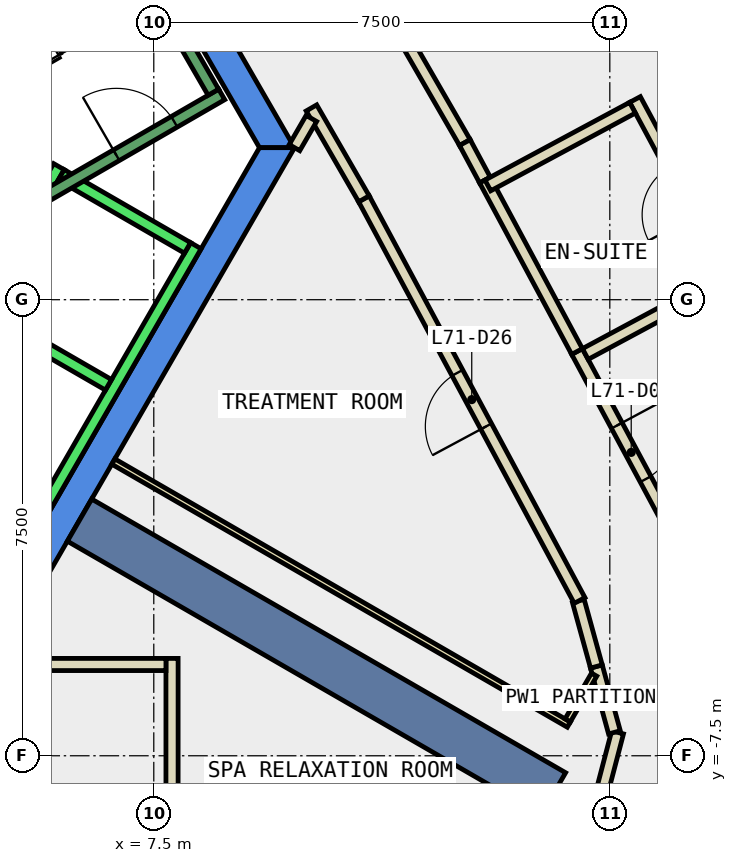
"""IFC4 building model, lengths in metres.
Left out: names, types, materials, properties, quantities, classifications, styles, units other than length and angle.
Written with IfcOpenShell. Run it as: python <this file> out.ifc"""

import sys

from ifc_helpers import new_model, si_unit, direction, frame, frame_2d, origin, place, context, subcontext, project, spatial, polyline, rectangle, outline, extrude, element, fill, save


model = new_model("IFC4")
c1 = context("Model", 3, precision=1e-05, world=origin(), true_north=direction((0.0, 1.0)))
c2 = subcontext(c1, "Body", "Model", "MODEL_VIEW")
j1 = project(units=[si_unit("LENGTHUNIT", "METRE"), si_unit("PLANEANGLEUNIT", "RADIAN")], contexts=[c1])
p1 = place(None, origin())
s1 = spatial("IfcSite", under=j1, at=p1, CompositionType="ELEMENT")
p2 = place(p1, origin())
s2 = spatial("IfcBuilding", under=s1, at=p2, CompositionType="ELEMENT")
p3 = place(p2, frame((0.0, 0.0, 304.4)))
s3 = spatial("IfcBuildingStorey", under=s2, at=p3, CompositionType="ELEMENT", Elevation=304.4)
p4 = place(p3, frame((0.0, 0.0, -0.34)))
e1 = element("IfcWall", 1, at=p4, inside=s3, PredefinedType="SHEAR", context=c2, shape_type="SweptSolid", body=[
    extrude(outline(polyline([(5.486, 9.998), (5.053, 9.748), (9.238, 2.5), (9.815, 2.5), (5.486, 9.998)])), origin(), (0.0, 0.0, 1.0), 3.6),
])
p5 = place(p3, frame((0.0, 0.0, -0.34)))
e2 = element("IfcWall", 2, at=p5, inside=s3, PredefinedType="SHEAR", context=c2, shape_type="SweptSolid", body=[
    extrude(outline(polyline([(4.907, -6.0), (9.815, 2.5), (9.238, 2.5), (4.619, -5.5), (4.907, -6.0)])), origin(), (0.0, 0.0, 1.0), 3.6),
])
p6 = place(p3, frame((6.279, -3.625, -0.34), z_axis=(0.0, 0.0, 1.0), x_axis=(0.866017533419, -0.500013631625, 0.0)))
e3 = element("IfcWall", 3, at=p6, inside=s3, PredefinedType="SHEAR", context=c2, shape_type="SweptSolid", body=[
    extrude(rectangle(XDim=9.0, YDim=0.8, at=frame_2d((4.5, 0.0))), origin(), (0.0, 0.0, 1.0), 3.6),
])
p7 = place(p3, frame((14.785, -8.425, 0.0), z_axis=(0.0, 0.0, 1.0), x_axis=(0.253295121261, 0.967389053869, 0.0)))
e4 = element("IfcWall", 4, at=p7, inside=s3, PredefinedType="PARTITIONING", context=c2, shape_type="SweptSolid", body=[
    extrude(rectangle(XDim=1.354, YDim=0.2, at=frame_2d((0.677, 0.0))), origin(), (0.0, 0.0, 1.0), 3.26),
])
p8 = place(p3, frame((15.076, -7.115, 0.0), z_axis=(0.0, 0.0, 1.0), x_axis=(-0.264368116744, 0.964421846937, 0.0)))
e5 = element("IfcWall", 5, at=p8, inside=s3, PredefinedType="PARTITIONING", context=c2, shape_type="SweptSolid", body=[
    extrude(rectangle(XDim=1.123, YDim=0.2, at=frame_2d((0.562, 0.0))), origin(), (0.0, 0.0, 1.0), 3.26),
])
p9 = place(p3, frame((14.779, -6.032, 0.0), z_axis=(0.0, 0.0, 1.0), x_axis=(-0.265740072272, 0.964044715762, 0.0)))
e6 = element("IfcWall", 6, at=p9, inside=s3, PredefinedType="PARTITIONING", context=c2, shape_type="SweptSolid", body=[
    extrude(rectangle(XDim=1.118, YDim=0.2, at=frame_2d((0.559, 0.0))), origin(), (0.0, 0.0, 1.0), 3.26),
])
p10 = place(p3, frame((14.503, -4.946, 0.0), z_axis=(0.0, 0.0, 1.0), x_axis=(-0.473101362557, 0.881008002658, 0.0)))
e7 = element("IfcWall", 7, at=p10, inside=s3, PredefinedType="PARTITIONING", context=c2, shape_type="SweptSolid", body=[
    extrude(rectangle(XDim=7.497, YDim=0.2, at=frame_2d((3.749, 0.0))), origin(), (0.0, 0.0, 1.0), 3.26),
])
p11 = place(p10, frame((3.249, 0.0, 0.0)))
e8 = element("IfcOpeningElement", 8, at=p11, cuts=e7, PredefinedType="OPENING", context=c2, shape_type="SweptSolid", body=[
    extrude(rectangle(XDim=1.0, YDim=2.1, at=frame_2d((0.5, 1.05))), frame((0.0, 0.11, 0.0), z_axis=(0.0, -1.0, 0.0), x_axis=(1.0, 0.0, 0.0)), (0.0, 0.0, 1.0), 0.22),
])
p12 = place(p3, frame((10.956, 1.659, 0.0), z_axis=(0.0, 0.0, 1.0), x_axis=(-0.49992648901, 0.866067841215, 0.0)))
e9 = element("IfcWall", 9, at=p12, inside=s3, PredefinedType="PARTITIONING", context=c2, shape_type="SweptSolid", body=[
    extrude(rectangle(XDim=1.726, YDim=0.2, at=frame_2d((0.863, 0.0))), origin(), (0.0, 0.0, 1.0), 3.26),
])
p13 = place(p3, frame((10.092, 2.981, 0.0), z_axis=(0.0, 0.0, 1.0), x_axis=(-0.501296484717, -0.865275582927, 0.0)))
e10 = element("IfcWall", 10, at=p13, inside=s3, PredefinedType="PARTITIONING", context=c2, shape_type="SweptSolid", body=[
    extrude(rectangle(XDim=0.555, YDim=0.2, at=frame_2d((0.277, 0.0))), origin(), (0.0, 0.0, 1.0), 3.26),
])
p14 = place(p3, frame((14.461, -0.852, 0.0), z_axis=(0.0, 0.0, 1.0), x_axis=(0.473160180459, -0.88097641491, 0.0)))
e11 = element("IfcWall", 11, at=p14, inside=s3, PredefinedType="PARTITIONING", context=c2, shape_type="SweptSolid", body=[
    extrude(rectangle(XDim=3.766, YDim=0.2, at=frame_2d((1.883, 0.0))), origin(), (0.0, 0.0, 1.0), 3.26),
])
p15 = place(p14, frame((1.383, 0.0, 0.0)))
e12 = element("IfcOpeningElement", 12, at=p15, cuts=e11, PredefinedType="OPENING", context=c2, shape_type="SweptSolid", body=[
    extrude(rectangle(XDim=1.0, YDim=2.1, at=frame_2d((0.5, 1.05))), frame((0.0, 0.11, 0.0), z_axis=(0.0, -1.0, 0.0), x_axis=(1.0, 0.0, 0.0)), (0.0, 0.0, 1.0), 0.22),
])
p16 = place(p3, frame((10.618, 6.044, 0.0), z_axis=(0.0, 0.0, 1.0), x_axis=(0.50008212199, -0.86597798544, 0.0)))
e13 = element("IfcWall", 13, at=p16, inside=s3, PredefinedType="PARTITIONING", context=c2, shape_type="SweptSolid", body=[
    extrude(rectangle(XDim=3.995, YDim=0.2, at=frame_2d((1.998, 0.0))), origin(), (0.0, 0.0, 1.0), 3.26),
])
p17 = place(p3, frame((12.616, 2.584, 0.0), z_axis=(0.0, 0.0, 1.0), x_axis=(0.472830911699, -0.881153181315, 0.0)))
e14 = element("IfcWall", 14, at=p17, inside=s3, PredefinedType="PARTITIONING", context=c2, shape_type="SweptSolid", body=[
    extrude(rectangle(XDim=0.7, YDim=0.2, at=frame_2d((0.35, 0.0))), origin(), (0.0, 0.0, 1.0), 3.26),
])
p18 = place(p3, frame((12.947, 1.967, 0.0), z_axis=(0.0, 0.0, 1.0), x_axis=(0.473116768279, -0.88099972961, 0.0)))
e15 = element("IfcWall", 15, at=p18, inside=s3, PredefinedType="PARTITIONING", context=c2, shape_type="SweptSolid", body=[
    extrude(rectangle(XDim=3.2, YDim=0.2, at=frame_2d((1.6, 0.0))), origin(), (0.0, 0.0, 1.0), 3.26),
])
p19 = place(p3, frame((7.8, -5.899, 0.0), z_axis=(0.0, 0.0, 1.0), x_axis=(0.0, -1.0, 0.0)))
e16 = element("IfcWall", 16, at=p19, inside=s3, PredefinedType="PARTITIONING", context=c2, shape_type="SweptSolid", body=[
    extrude(rectangle(XDim=4.66, YDim=0.2, at=frame_2d((2.33, 0.0))), origin(), (0.0, 0.0, 1.0), 3.26),
])
p20 = place(p3, frame((6.835, -2.662, 0.0), z_axis=(0.0, 0.0, 1.0), x_axis=(0.866023427642, -0.500003422764, 0.0)))
e17 = element("IfcWall", 17, at=p20, inside=s3, PredefinedType="PARTITIONING", context=c2, shape_type="SweptSolid", body=[
    extrude(rectangle(XDim=8.65, YDim=0.1, at=frame_2d((4.325, 0.0))), origin(), (0.0, 0.0, 1.0), 3.26),
])
p21 = place(p3, frame((14.307, -6.919, 0.0), z_axis=(0.0, 0.0, 1.0), x_axis=(0.500305662732, 0.865848857387, 0.0)))
e18 = element("IfcWall", 18, at=p21, inside=s3, PredefinedType="PARTITIONING", context=c2, shape_type="SweptSolid", body=[
    extrude(rectangle(XDim=0.87, YDim=0.1, at=frame_2d((0.435, 0.0))), origin(), (0.0, 0.0, 1.0), 3.26),
])
p22 = place(p3, frame((14.597, -0.893, 0.0), z_axis=(0.0, 0.0, 1.0), x_axis=(0.880971229432, 0.473169835168, 0.0)))
e19 = element("IfcWall", 19, at=p22, inside=s3, PredefinedType="PARTITIONING", context=c2, shape_type="SweptSolid", body=[
    extrude(rectangle(XDim=2.599, YDim=0.2, at=frame_2d((1.3, 0.0))), origin(), (0.0, 0.0, 1.0), 3.26),
])
p23 = place(p3, frame((17.023, 0.297, 0.0), z_axis=(0.0, 0.0, 1.0), x_axis=(-0.473247398557, 0.88092956572, 0.0)))
e20 = element("IfcWall", 20, at=p23, inside=s3, PredefinedType="PARTITIONING", context=c2, shape_type="SweptSolid", body=[
    extrude(rectangle(XDim=3.4, YDim=0.2, at=frame_2d((1.7, 0.0))), origin(), (0.0, 0.0, 1.0), 3.26),
])
p24 = place(p23, frame((1.25, 0.0, 0.0)))
e21 = element("IfcOpeningElement", 21, at=p24, cuts=e20, PredefinedType="OPENING", context=c2, shape_type="SweptSolid", body=[
    extrude(rectangle(XDim=0.9, YDim=2.1, at=frame_2d((0.45, 1.05))), frame((0.0, 0.11, 0.0), z_axis=(0.0, -1.0, 0.0), x_axis=(1.0, 0.0, 0.0)), (0.0, 0.0, 1.0), 0.22),
])
p25 = place(p3, frame((15.373, 3.157, 0.0), z_axis=(0.0, 0.0, 1.0), x_axis=(-0.880935111027, -0.473237076062, 0.0)))
e22 = element("IfcWall", 22, at=p25, inside=s3, PredefinedType="PARTITIONING", context=c2, shape_type="SweptSolid", body=[
    extrude(rectangle(XDim=2.701, YDim=0.2, at=frame_2d((1.35, 0.0))), origin(), (0.0, 0.0, 1.0), 3.26),
])
p26 = place(p3, frame((5.076, -5.999, 0.0), z_axis=(0.0, 0.0, 1.0), x_axis=(1.0, 0.0, 0.0)))
e23 = element("IfcWall", 23, at=p26, inside=s3, PredefinedType="PARTITIONING", context=c2, shape_type="SweptSolid", body=[
    extrude(rectangle(XDim=2.624, YDim=0.2, at=frame_2d((1.312, 0.0))), origin(), (0.0, 0.0, 1.0), 3.26),
])
p27 = place(p3, frame((3.24, -2.488, 0.0), z_axis=(0.0, 0.0, 1.0), x_axis=(0.500034260056, 0.866005622828, 0.0)))
e24 = element("IfcWall", 24, at=p27, inside=s3, PredefinedType="STANDARD", context=c2, shape_type="SweptSolid", body=[
    extrude(rectangle(XDim=5.399, YDim=0.2, at=frame_2d((2.7, 0.0))), origin(), (0.0, 0.0, 1.0), 3.26),
])
p28 = place(p27, frame((3.225, 0.0, 0.0)))
e25 = element("IfcOpeningElement", 25, at=p28, cuts=e24, PredefinedType="OPENING", context=c2, shape_type="SweptSolid", body=[
    extrude(rectangle(XDim=1.1, YDim=2.1, at=frame_2d((0.55, 1.05))), frame((0.0, 0.11, 0.0), z_axis=(0.0, -1.0, 0.0), x_axis=(1.0, 0.0, 0.0)), (0.0, 0.0, 1.0), 0.22),
])
p29 = place(p27, frame((1.225, 0.0, 0.0)))
e26 = element("IfcOpeningElement", 26, at=p29, cuts=e24, PredefinedType="OPENING", context=c2, shape_type="SweptSolid", body=[
    extrude(rectangle(XDim=1.1, YDim=2.1, at=frame_2d((0.55, 1.05))), frame((0.0, 0.11, 0.0), z_axis=(0.0, -1.0, 0.0), x_axis=(1.0, 0.0, 0.0)), (0.0, 0.0, 1.0), 0.22),
])
p30 = place(p3, frame((5.492, -3.788, 0.0), z_axis=(0.0, 0.0, 1.0), x_axis=(0.500034260056, 0.866005622828, 0.0)))
e27 = element("IfcWall", 27, at=p30, inside=s3, PredefinedType="STANDARD", context=c2, shape_type="SweptSolid", body=[
    extrude(rectangle(XDim=5.399, YDim=0.2, at=frame_2d((2.7, 0.0))), origin(), (0.0, 0.0, 1.0), 3.26),
])
for number, where, z_axis, x_axis in (
    (28, (4.677, -0.2, 0.0), (0.0, 0.0, 1.0), (0.866, -0.5, 0.0)),
    (29, (5.977, 2.052, 0.0), (0.0, 0.0, 1.0), (0.866, -0.5, 0.0)),
):
    element("IfcWall", number, at=place(p3, frame(where, z_axis=z_axis, x_axis=x_axis)), inside=s3, PredefinedType="STANDARD", context=c2, shape_type="SweptSolid", body=[
        extrude(rectangle(XDim=2.399, YDim=0.2, at=frame_2d((1.2, 0.0))), origin(), (0.0, 0.0, 1.0), 3.26),
    ])
p31 = place(p3, frame((4.806, 1.176, 0.0), z_axis=(0.0, 0.0, 1.0), x_axis=(0.866059941101, 0.499940174841, 0.0)))
e30 = element("IfcWall", 30, at=p31, inside=s3, PredefinedType="STANDARD", context=c2, shape_type="SweptSolid", body=[
    extrude(rectangle(XDim=4.4, YDim=0.2, at=frame_2d((2.2, 0.0))), origin(), (0.0, 0.0, 1.0), 3.26),
])
p32 = place(p31, frame((2.4, 0.0, 0.0)))
e31 = element("IfcOpeningElement", 31, at=p32, cuts=e30, PredefinedType="OPENING", context=c2, shape_type="SweptSolid", body=[
    extrude(rectangle(XDim=1.1, YDim=2.2, at=frame_2d((0.55, 1.1))), frame((0.0, 0.11, 0.0), z_axis=(0.0, -1.0, 0.0), x_axis=(1.0, 0.0, 0.0)), (0.0, 0.0, 1.0), 0.22),
])
p33 = place(p3, frame((8.48, 3.412, 0.0), z_axis=(0.0, 0.0, 1.0), x_axis=(-0.499978703459, 0.866037698999, 0.0)))
e32 = element("IfcWall", 32, at=p33, inside=s3, PredefinedType="STANDARD", context=c2, shape_type="SweptSolid", body=[
    extrude(rectangle(XDim=6.9, YDim=0.2, at=frame_2d((3.45, 0.0))), origin(), (0.0, 0.0, 1.0), 3.26),
])
p34 = place(p15, origin())
e33 = element("IfcDoor", 33, at=p34, inside=s3, OperationType="SINGLE_SWING_LEFT", PredefinedType="DOOR", context=c2, shape_type="SweptSolid", body=[
    extrude(rectangle(XDim=1.0, YDim=2.1, at=frame_2d((0.5, 1.05))), frame((0.0, 0.025, 0.0), z_axis=(0.0, -1.0, 0.0), x_axis=(1.0, 0.0, 0.0)), (0.0, 0.0, 1.0), 0.05),
])
fill(e12, e33)
p35 = place(p11, origin())
e34 = element("IfcDoor", 34, at=p35, inside=s3, OperationType="SINGLE_SWING_LEFT", PredefinedType="DOOR", context=c2, shape_type="SweptSolid", body=[
    extrude(rectangle(XDim=1.0, YDim=2.1, at=frame_2d((0.5, 1.05))), frame((0.0, 0.025, 0.0), z_axis=(0.0, -1.0, 0.0), x_axis=(1.0, 0.0, 0.0)), (0.0, 0.0, 1.0), 0.05),
])
fill(e8, e34)
p36 = place(p32, origin())
e35 = element("IfcDoor", 35, at=p36, inside=s3, OperationType="SINGLE_SWING_LEFT", PredefinedType="DOOR", context=c2, shape_type="SweptSolid", body=[
    extrude(rectangle(XDim=1.1, YDim=2.2, at=frame_2d((0.55, 1.1))), frame((0.0, 0.025, 0.0), z_axis=(0.0, -1.0, 0.0), x_axis=(1.0, 0.0, 0.0)), (0.0, 0.0, 1.0), 0.05),
])
fill(e31, e35)
save(model, sys.argv[1])
